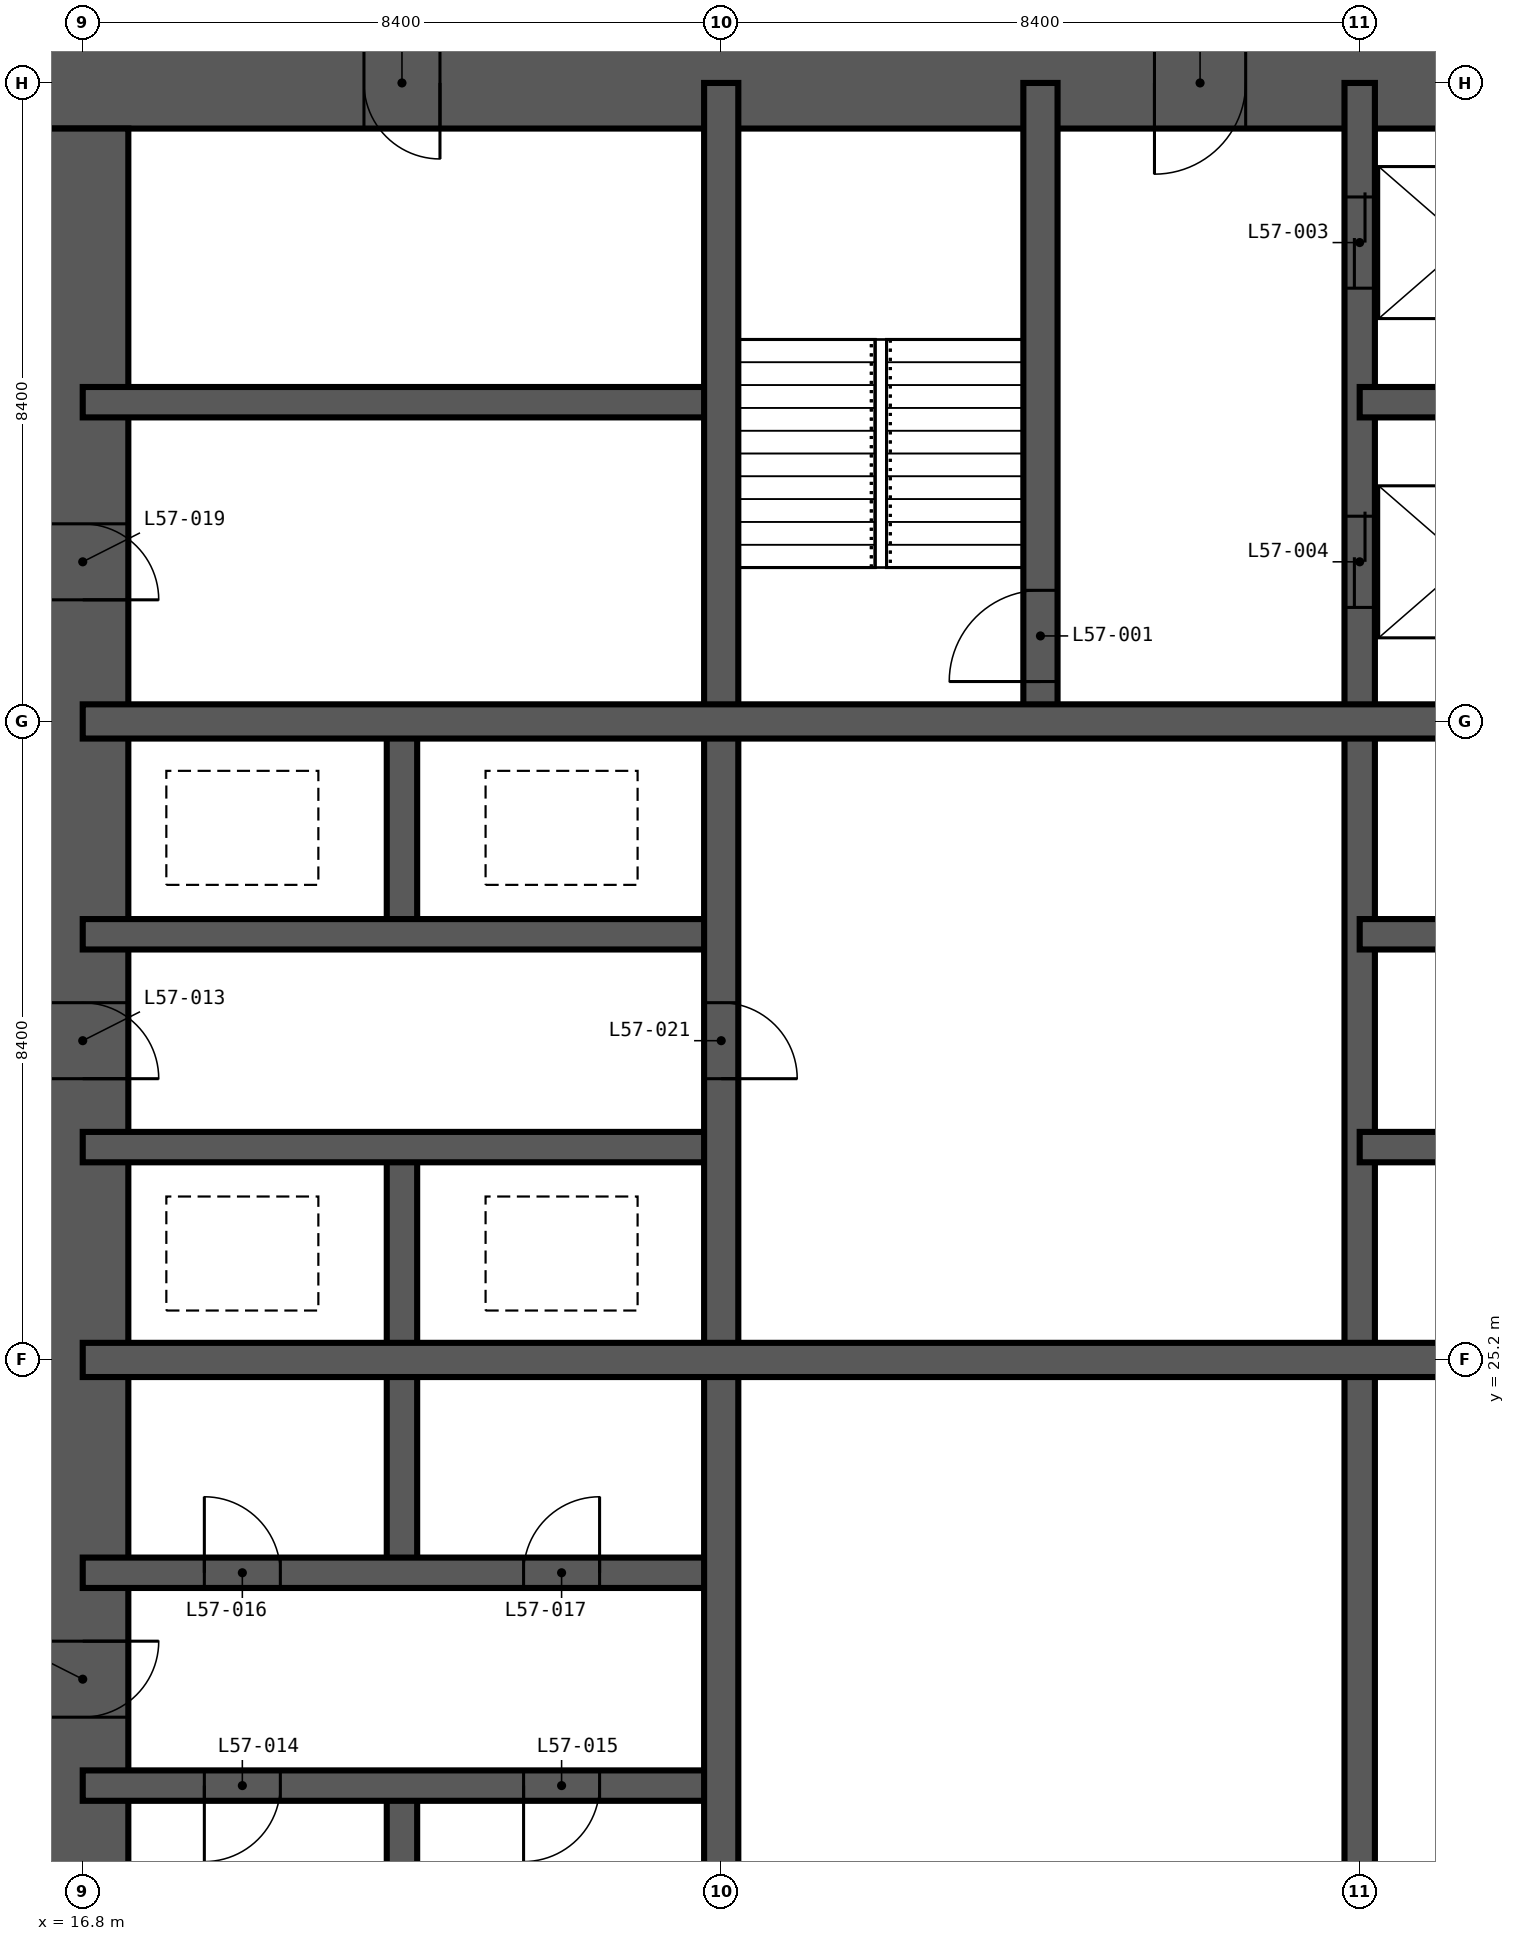
"""IFC4 building model, lengths in metres.
Left out: names, types, materials, properties, quantities, classifications, styles, units other than length and angle.
Written with IfcOpenShell. Run it as: python <this file> out.ifc"""

import sys

from ifc_helpers import new_model, si_unit, direction, frame, frame_2d, origin, place, context, subcontext, project, spatial, rectangle, extrude, element, fill, save


model = new_model("IFC4")
c1 = context("Model", 3, precision=1e-05, world=origin(), true_north=direction((0.0, 1.0)))
c2 = subcontext(c1, "Body", "Model", "MODEL_VIEW")
j1 = project(units=[si_unit("LENGTHUNIT", "METRE"), si_unit("PLANEANGLEUNIT", "RADIAN")], contexts=[c1])
p1 = place(None, origin())
s1 = spatial("IfcSite", under=j1, at=p1, CompositionType="ELEMENT")
p2 = place(p1, origin())
s2 = spatial("IfcBuilding", under=s1, at=p2, CompositionType="ELEMENT")
p3 = place(p2, frame((0.0, 0.0, 220.2)))
s3 = spatial("IfcBuildingStorey", under=s2, at=p3, CompositionType="ELEMENT", Elevation=220.2)
p4 = place(p3, frame((42.6, 42.0, -0.4), z_axis=(0.0, 0.0, 1.0), x_axis=(-1.0, 0.0, 0.0)))
e1 = element("IfcWall", 1, at=p4, inside=s3, PredefinedType="SHEAR", context=c2, shape_type="SweptSolid", body=[
    extrude(rectangle(XDim=26.4, YDim=1.2, at=frame_2d((13.2, 0.0))), origin(), (0.0, 0.0, 1.0), 5.45),
])
p5 = place(p4, frame((21.1, 0.0, 0.4)))
e2 = element("IfcOpeningElement", 2, at=p5, cuts=e1, PredefinedType="OPENING", context=c2, shape_type="SweptSolid", body=[
    extrude(rectangle(XDim=1.0, YDim=2.1, at=frame_2d((0.5, 1.05))), frame((0.0, 0.61, 0.0), z_axis=(0.0, -1.0, 0.0), x_axis=(1.0, 0.0, 0.0)), (0.0, 0.0, 1.0), 1.22),
])
p6 = place(p4, frame((10.5, 0.0, 0.4)))
e3 = element("IfcOpeningElement", 3, at=p6, cuts=e1, PredefinedType="OPENING", context=c2, shape_type="SweptSolid", body=[
    extrude(rectangle(XDim=1.2, YDim=2.2, at=frame_2d((0.6, 1.1))), frame((0.0, 0.61, 0.0), z_axis=(0.0, -1.0, 0.0), x_axis=(1.0, 0.0, 0.0)), (0.0, 0.0, 1.0), 1.22),
])
p7 = place(p3, frame((16.8, 41.4, -0.4), z_axis=(0.0, 0.0, 1.0), x_axis=(0.0, -1.0, 0.0)))
e4 = element("IfcWall", 4, at=p7, inside=s3, PredefinedType="SHEAR", context=c2, shape_type="SweptSolid", body=[
    extrude(rectangle(XDim=24.0, YDim=1.2, at=frame_2d((12.0, 0.0))), origin(), (0.0, 0.0, 1.0), 5.45),
])
p8 = place(p7, frame((11.5, 0.0, 0.4)))
e5 = element("IfcOpeningElement", 5, at=p8, cuts=e4, PredefinedType="OPENING", context=c2, shape_type="SweptSolid", body=[
    extrude(rectangle(XDim=1.0, YDim=2.1, at=frame_2d((0.5, 1.05))), frame((0.0, 0.61, 0.0), z_axis=(0.0, -1.0, 0.0), x_axis=(1.0, 0.0, 0.0)), (0.0, 0.0, 1.0), 1.22),
])
p9 = place(p7, frame((19.9, 0.0, 0.4)))
e6 = element("IfcOpeningElement", 6, at=p9, cuts=e4, PredefinedType="OPENING", context=c2, shape_type="SweptSolid", body=[
    extrude(rectangle(XDim=1.0, YDim=2.1, at=frame_2d((0.5, 1.05))), frame((0.0, 0.61, 0.0), z_axis=(0.0, -1.0, 0.0), x_axis=(1.0, 0.0, 0.0)), (0.0, 0.0, 1.0), 1.22),
])
p10 = place(p7, frame((5.2, 0.0, 0.4)))
e7 = element("IfcOpeningElement", 7, at=p10, cuts=e4, PredefinedType="OPENING", context=c2, shape_type="SweptSolid", body=[
    extrude(rectangle(XDim=1.0, YDim=2.1, at=frame_2d((0.5, 1.05))), frame((0.0, 0.61, 0.0), z_axis=(0.0, -1.0, 0.0), x_axis=(1.0, 0.0, 0.0)), (0.0, 0.0, 1.0), 1.22),
])
p11 = place(p3, frame((21.0, 16.8, -0.4), z_axis=(0.0, 0.0, 1.0), x_axis=(0.0, 1.0, 0.0)))
e8 = element("IfcWall", 8, at=p11, inside=s3, PredefinedType="SHEAR", context=c2, shape_type="SweptSolid", body=[
    extrude(rectangle(XDim=2.8, YDim=0.4, at=frame_2d((1.4, 0.0))), origin(), (0.0, 0.0, 1.0), 5.45),
])
p12 = place(p3, frame((21.0, 22.4, -0.4), z_axis=(0.0, 0.0, 1.0), x_axis=(0.0, 1.0, 0.0)))
e9 = element("IfcWall", 9, at=p12, inside=s3, PredefinedType="SHEAR", context=c2, shape_type="SweptSolid", body=[
    extrude(rectangle(XDim=5.6, YDim=0.4, at=frame_2d((2.8, 0.0))), origin(), (0.0, 0.0, 1.0), 5.45),
])
p13 = place(p3, frame((21.0, 30.8, -0.4), z_axis=(0.0, 0.0, 1.0), x_axis=(0.0, 1.0, 0.0)))
e10 = element("IfcWall", 10, at=p13, inside=s3, PredefinedType="SHEAR", context=c2, shape_type="SweptSolid", body=[
    extrude(rectangle(XDim=2.8, YDim=0.4, at=frame_2d((1.4, 0.0))), origin(), (0.0, 0.0, 1.0), 5.45),
])
p14 = place(p3, frame((33.6, 16.8, -0.4), z_axis=(0.0, 0.0, 1.0), x_axis=(0.0, 1.0, 0.0)))
e11 = element("IfcWall", 11, at=p14, inside=s3, PredefinedType="SHEAR", context=c2, shape_type="SweptSolid", body=[
    extrude(rectangle(XDim=25.2, YDim=0.4, at=frame_2d((12.6, 0.0))), origin(), (0.0, 0.0, 1.0), 5.45),
])
p15 = place(p14, frame((22.5, 0.0, 0.4)))
e12 = element("IfcOpeningElement", 12, at=p15, cuts=e11, PredefinedType="OPENING", context=c2, shape_type="SweptSolid", body=[
    extrude(rectangle(XDim=1.2, YDim=2.2, at=frame_2d((0.6, 1.1))), frame((0.0, 0.21, 0.0), z_axis=(0.0, -1.0, 0.0), x_axis=(1.0, 0.0, 0.0)), (0.0, 0.0, 1.0), 0.42),
])
p16 = place(p14, frame((18.3, 0.0, 0.4)))
e13 = element("IfcOpeningElement", 13, at=p16, cuts=e11, PredefinedType="OPENING", context=c2, shape_type="SweptSolid", body=[
    extrude(rectangle(XDim=1.2, YDim=2.2, at=frame_2d((0.6, 1.1))), frame((0.0, 0.21, 0.0), z_axis=(0.0, -1.0, 0.0), x_axis=(1.0, 0.0, 0.0)), (0.0, 0.0, 1.0), 0.42),
])
p17 = place(p3, frame((16.8, 19.6, -0.4), z_axis=(0.0, 0.0, 1.0), x_axis=(1.0, 0.0, 0.0)))
e14 = element("IfcWall", 14, at=p17, inside=s3, PredefinedType="SHEAR", context=c2, shape_type="SweptSolid", body=[
    extrude(rectangle(XDim=8.4, YDim=0.4, at=frame_2d((4.2, 0.0))), origin(), (0.0, 0.0, 1.0), 5.45),
])
p18 = place(p17, frame((1.6, 0.0, 0.4)))
e15 = element("IfcOpeningElement", 15, at=p18, cuts=e14, PredefinedType="OPENING", context=c2, shape_type="SweptSolid", body=[
    extrude(rectangle(XDim=1.0, YDim=2.1, at=frame_2d((0.5, 1.05))), frame((0.0, 0.21, 0.0), z_axis=(0.0, -1.0, 0.0), x_axis=(1.0, 0.0, 0.0)), (0.0, 0.0, 1.0), 0.42),
])
p19 = place(p17, frame((5.8, 0.0, 0.4)))
e16 = element("IfcOpeningElement", 16, at=p19, cuts=e14, PredefinedType="OPENING", context=c2, shape_type="SweptSolid", body=[
    extrude(rectangle(XDim=1.0, YDim=2.1, at=frame_2d((0.5, 1.05))), frame((0.0, 0.21, 0.0), z_axis=(0.0, -1.0, 0.0), x_axis=(1.0, 0.0, 0.0)), (0.0, 0.0, 1.0), 0.42),
])
p20 = place(p3, frame((16.8, 22.4, -0.4), z_axis=(0.0, 0.0, 1.0), x_axis=(1.0, 0.0, 0.0)))
e17 = element("IfcWall", 17, at=p20, inside=s3, PredefinedType="SHEAR", context=c2, shape_type="SweptSolid", body=[
    extrude(rectangle(XDim=8.4, YDim=0.4, at=frame_2d((4.2, 0.0))), origin(), (0.0, 0.0, 1.0), 5.45),
])
p21 = place(p20, frame((1.6, 0.0, 0.4)))
e18 = element("IfcOpeningElement", 18, at=p21, cuts=e17, PredefinedType="OPENING", context=c2, shape_type="SweptSolid", body=[
    extrude(rectangle(XDim=1.0, YDim=2.1, at=frame_2d((0.5, 1.05))), frame((0.0, 0.21, 0.0), z_axis=(0.0, -1.0, 0.0), x_axis=(1.0, 0.0, 0.0)), (0.0, 0.0, 1.0), 0.42),
])
p22 = place(p20, frame((5.8, 0.0, 0.4)))
e19 = element("IfcOpeningElement", 19, at=p22, cuts=e17, PredefinedType="OPENING", context=c2, shape_type="SweptSolid", body=[
    extrude(rectangle(XDim=1.0, YDim=2.1, at=frame_2d((0.5, 1.05))), frame((0.0, 0.21, 0.0), z_axis=(0.0, -1.0, 0.0), x_axis=(1.0, 0.0, 0.0)), (0.0, 0.0, 1.0), 0.42),
])
p23 = place(p3, frame((16.8, 28.0, -0.4), z_axis=(0.0, 0.0, 1.0), x_axis=(1.0, 0.0, 0.0)))
e20 = element("IfcWall", 20, at=p23, inside=s3, PredefinedType="SHEAR", context=c2, shape_type="SweptSolid", body=[
    extrude(rectangle(XDim=8.4, YDim=0.4, at=frame_2d((4.2, 0.0))), origin(), (0.0, 0.0, 1.0), 5.45),
])
p24 = place(p3, frame((33.6, 28.0, -0.4), z_axis=(0.0, 0.0, 1.0), x_axis=(1.0, 0.0, 0.0)))
e21 = element("IfcWall", 21, at=p24, inside=s3, PredefinedType="SHEAR", context=c2, shape_type="SweptSolid", body=[
    extrude(rectangle(XDim=8.4, YDim=0.4, at=frame_2d((4.2, 0.0))), origin(), (0.0, 0.0, 1.0), 5.45),
])
p25 = place(p24, frame((1.6, 0.0, 0.4)))
e22 = element("IfcOpeningElement", 22, at=p25, cuts=e21, PredefinedType="OPENING", context=c2, shape_type="SweptSolid", body=[
    extrude(rectangle(XDim=1.0, YDim=2.1, at=frame_2d((0.5, 1.05))), frame((0.0, 0.21, 0.0), z_axis=(0.0, -1.0, 0.0), x_axis=(1.0, 0.0, 0.0)), (0.0, 0.0, 1.0), 0.42),
])
p26 = place(p24, frame((4.6, 0.0, 0.4)))
e23 = element("IfcOpeningElement", 23, at=p26, cuts=e21, PredefinedType="OPENING", context=c2, shape_type="SweptSolid", body=[
    extrude(rectangle(XDim=1.0, YDim=2.1, at=frame_2d((0.5, 1.05))), frame((0.0, 0.21, 0.0), z_axis=(0.0, -1.0, 0.0), x_axis=(1.0, 0.0, 0.0)), (0.0, 0.0, 1.0), 0.42),
])
for number, where, z_axis, x_axis in (
    (24, (16.8, 30.8, -0.4), (0.0, 0.0, 1.0), (1.0, 0.0, 0.0)),
    (25, (33.6, 30.8, -0.4), (0.0, 0.0, 1.0), (1.0, 0.0, 0.0)),
    (26, (16.8, 37.8, -0.4), (0.0, 0.0, 1.0), (1.0, 0.0, 0.0)),
):
    element("IfcWall", number, at=place(p3, frame(where, z_axis=z_axis, x_axis=x_axis)), inside=s3, PredefinedType="SHEAR", context=c2, shape_type="SweptSolid", body=[
        extrude(rectangle(XDim=8.4, YDim=0.4, at=frame_2d((4.2, 0.0))), origin(), (0.0, 0.0, 1.0), 5.45),
    ])
p27 = place(p3, frame((33.6, 37.8, -0.4), z_axis=(0.0, 0.0, 1.0), x_axis=(1.0, 0.0, 0.0)))
e27 = element("IfcWall", 27, at=p27, inside=s3, PredefinedType="SHEAR", context=c2, shape_type="SweptSolid", body=[
    extrude(rectangle(XDim=2.8, YDim=0.4, at=frame_2d((1.4, 0.0))), origin(), (0.0, 0.0, 1.0), 5.45),
])
p28 = place(p3, frame((25.2, 16.8, -0.4), z_axis=(0.0, 0.0, 1.0), x_axis=(0.0, 1.0, 0.0)))
e28 = element("IfcWall", 28, at=p28, inside=s3, PredefinedType="SHEAR", context=c2, shape_type="SweptSolid", body=[
    extrude(rectangle(XDim=25.2, YDim=0.45, at=frame_2d((12.6, 0.0))), origin(), (0.0, 0.0, 1.0), 5.45),
])
p29 = place(p28, frame((12.1, 0.0, 0.4)))
e29 = element("IfcOpeningElement", 29, at=p29, cuts=e28, PredefinedType="OPENING", context=c2, shape_type="SweptSolid", body=[
    extrude(rectangle(XDim=1.0, YDim=2.1, at=frame_2d((0.5, 1.05))), frame((0.0, 0.235, 0.0), z_axis=(0.0, -1.0, 0.0), x_axis=(1.0, 0.0, 0.0)), (0.0, 0.0, 1.0), 0.47),
])
p30 = place(p3, frame((29.4, 33.6, -0.4), z_axis=(0.0, 0.0, 1.0), x_axis=(0.0, 1.0, 0.0)))
e30 = element("IfcWall", 30, at=p30, inside=s3, PredefinedType="SHEAR", context=c2, shape_type="SweptSolid", body=[
    extrude(rectangle(XDim=8.4, YDim=0.45, at=frame_2d((4.2, 0.0))), origin(), (0.0, 0.0, 1.0), 5.45),
])
p31 = place(p30, frame((0.525, 0.0, 0.4)))
e31 = element("IfcOpeningElement", 31, at=p31, cuts=e30, PredefinedType="OPENING", context=c2, shape_type="SweptSolid", body=[
    extrude(rectangle(XDim=1.2, YDim=2.2, at=frame_2d((0.6, 1.1))), frame((0.0, 0.235, 0.0), z_axis=(0.0, -1.0, 0.0), x_axis=(1.0, 0.0, 0.0)), (0.0, 0.0, 1.0), 0.47),
])
for number, where, z_axis, x_axis in (
    (32, (16.8, 25.2, -0.4), (0.0, 0.0, 1.0), (1.0, 0.0, 0.0)),
    (33, (16.8, 33.6, -0.4), (0.0, 0.0, 1.0), (1.0, 0.0, 0.0)),
):
    element("IfcWall", number, at=place(p3, frame(where, z_axis=z_axis, x_axis=x_axis)), inside=s3, PredefinedType="SHEAR", context=c2, shape_type="SweptSolid", body=[
        extrude(rectangle(XDim=25.2, YDim=0.45, at=frame_2d((12.6, 0.0))), origin(), (0.0, 0.0, 1.0), 5.45),
    ])
p32 = place(p31, origin())
e34 = element("IfcDoor", 34, at=p32, inside=s3, OperationType="SINGLE_SWING_LEFT", PredefinedType="DOOR", context=c2, shape_type="SweptSolid", body=[
    extrude(rectangle(XDim=1.2, YDim=2.2, at=frame_2d((0.6, 1.1))), frame((0.0, 0.025, 0.0), z_axis=(0.0, -1.0, 0.0), x_axis=(1.0, 0.0, 0.0)), (0.0, 0.0, 1.0), 0.05),
])
fill(e31, e34)
p33 = place(p15, origin())
e35 = element("IfcDoor", 35, at=p33, inside=s3, OperationType="DOUBLE_DOOR_SLIDING", PredefinedType="DOOR", context=c2, shape_type="SweptSolid", body=[
    extrude(rectangle(XDim=1.2, YDim=2.2, at=frame_2d((0.6, 1.1))), frame((0.0, 0.025, 0.0), z_axis=(0.0, -1.0, 0.0), x_axis=(1.0, 0.0, 0.0)), (0.0, 0.0, 1.0), 0.05),
])
fill(e12, e35)
p34 = place(p16, origin())
e36 = element("IfcDoor", 36, at=p34, inside=s3, OperationType="DOUBLE_DOOR_SLIDING", PredefinedType="DOOR", context=c2, shape_type="SweptSolid", body=[
    extrude(rectangle(XDim=1.2, YDim=2.2, at=frame_2d((0.6, 1.1))), frame((0.0, 0.025, 0.0), z_axis=(0.0, -1.0, 0.0), x_axis=(1.0, 0.0, 0.0)), (0.0, 0.0, 1.0), 0.05),
])
fill(e13, e36)
p35 = place(p8, origin())
e37 = element("IfcDoor", 37, at=p35, inside=s3, OperationType="SINGLE_SWING_RIGHT", PredefinedType="DOOR", context=c2, shape_type="SweptSolid", body=[
    extrude(rectangle(XDim=1.0, YDim=2.1, at=frame_2d((0.5, 1.05))), frame((0.0, 0.025, 0.0), z_axis=(0.0, -1.0, 0.0), x_axis=(1.0, 0.0, 0.0)), (0.0, 0.0, 1.0), 0.05),
])
fill(e5, e37)
p36 = place(p18, frame((1.0, 0.0, 0.0), z_axis=(0.0, 0.0, 1.0), x_axis=(-1.0, 0.0, 0.0)))
e38 = element("IfcDoor", 38, at=p36, inside=s3, OperationType="SINGLE_SWING_RIGHT", PredefinedType="DOOR", context=c2, shape_type="SweptSolid", body=[
    extrude(rectangle(XDim=1.0, YDim=2.1, at=frame_2d((0.5, 1.05))), frame((0.0, 0.025, 0.0), z_axis=(0.0, -1.0, 0.0), x_axis=(1.0, 0.0, 0.0)), (0.0, 0.0, 1.0), 0.05),
])
fill(e15, e38)
p37 = place(p19, frame((1.0, 0.0, 0.0), z_axis=(0.0, 0.0, 1.0), x_axis=(-1.0, 0.0, 0.0)))
e39 = element("IfcDoor", 39, at=p37, inside=s3, OperationType="SINGLE_SWING_RIGHT", PredefinedType="DOOR", context=c2, shape_type="SweptSolid", body=[
    extrude(rectangle(XDim=1.0, YDim=2.1, at=frame_2d((0.5, 1.05))), frame((0.0, 0.025, 0.0), z_axis=(0.0, -1.0, 0.0), x_axis=(1.0, 0.0, 0.0)), (0.0, 0.0, 1.0), 0.05),
])
fill(e16, e39)
p38 = place(p21, origin())
e40 = element("IfcDoor", 40, at=p38, inside=s3, OperationType="SINGLE_SWING_LEFT", PredefinedType="DOOR", context=c2, shape_type="SweptSolid", body=[
    extrude(rectangle(XDim=1.0, YDim=2.1, at=frame_2d((0.5, 1.05))), frame((0.0, 0.025, 0.0), z_axis=(0.0, -1.0, 0.0), x_axis=(1.0, 0.0, 0.0)), (0.0, 0.0, 1.0), 0.05),
])
fill(e18, e40)
p39 = place(p22, origin())
e41 = element("IfcDoor", 41, at=p39, inside=s3, OperationType="SINGLE_SWING_RIGHT", PredefinedType="DOOR", context=c2, shape_type="SweptSolid", body=[
    extrude(rectangle(XDim=1.0, YDim=2.1, at=frame_2d((0.5, 1.05))), frame((0.0, 0.025, 0.0), z_axis=(0.0, -1.0, 0.0), x_axis=(1.0, 0.0, 0.0)), (0.0, 0.0, 1.0), 0.05),
])
fill(e19, e41)
p40 = place(p9, origin())
e42 = element("IfcDoor", 42, at=p40, inside=s3, OperationType="SINGLE_SWING_LEFT", PredefinedType="DOOR", context=c2, shape_type="SweptSolid", body=[
    extrude(rectangle(XDim=1.0, YDim=2.1, at=frame_2d((0.5, 1.05))), frame((0.0, 0.025, 0.0), z_axis=(0.0, -1.0, 0.0), x_axis=(1.0, 0.0, 0.0)), (0.0, 0.0, 1.0), 0.05),
])
fill(e6, e42)
p41 = place(p10, origin())
e43 = element("IfcDoor", 43, at=p41, inside=s3, OperationType="SINGLE_SWING_RIGHT", PredefinedType="DOOR", context=c2, shape_type="SweptSolid", body=[
    extrude(rectangle(XDim=1.0, YDim=2.1, at=frame_2d((0.5, 1.05))), frame((0.0, 0.025, 0.0), z_axis=(0.0, -1.0, 0.0), x_axis=(1.0, 0.0, 0.0)), (0.0, 0.0, 1.0), 0.05),
])
fill(e7, e43)
p42 = place(p5, origin())
e44 = element("IfcDoor", 44, at=p42, inside=s3, OperationType="SINGLE_SWING_LEFT", PredefinedType="DOOR", context=c2, shape_type="SweptSolid", body=[
    extrude(rectangle(XDim=1.0, YDim=2.1, at=frame_2d((0.5, 1.05))), frame((0.0, 0.025, 0.0), z_axis=(0.0, -1.0, 0.0), x_axis=(1.0, 0.0, 0.0)), (0.0, 0.0, 1.0), 0.05),
])
fill(e2, e44)
p43 = place(p29, frame((1.0, 0.0, 0.0), z_axis=(0.0, 0.0, 1.0), x_axis=(-1.0, 0.0, 0.0)))
e45 = element("IfcDoor", 45, at=p43, inside=s3, OperationType="SINGLE_SWING_RIGHT", PredefinedType="DOOR", context=c2, shape_type="SweptSolid", body=[
    extrude(rectangle(XDim=1.0, YDim=2.1, at=frame_2d((0.5, 1.05))), frame((0.0, 0.025, 0.0), z_axis=(0.0, -1.0, 0.0), x_axis=(1.0, 0.0, 0.0)), (0.0, 0.0, 1.0), 0.05),
])
fill(e29, e45)
p44 = place(p6, origin())
e46 = element("IfcDoor", 46, at=p44, inside=s3, OperationType="SINGLE_SWING_RIGHT", PredefinedType="DOOR", context=c2, shape_type="SweptSolid", body=[
    extrude(rectangle(XDim=1.2, YDim=2.2, at=frame_2d((0.6, 1.1))), frame((0.0, 0.025, 0.0), z_axis=(0.0, -1.0, 0.0), x_axis=(1.0, 0.0, 0.0)), (0.0, 0.0, 1.0), 0.05),
])
fill(e3, e46)
save(model, sys.argv[1])
